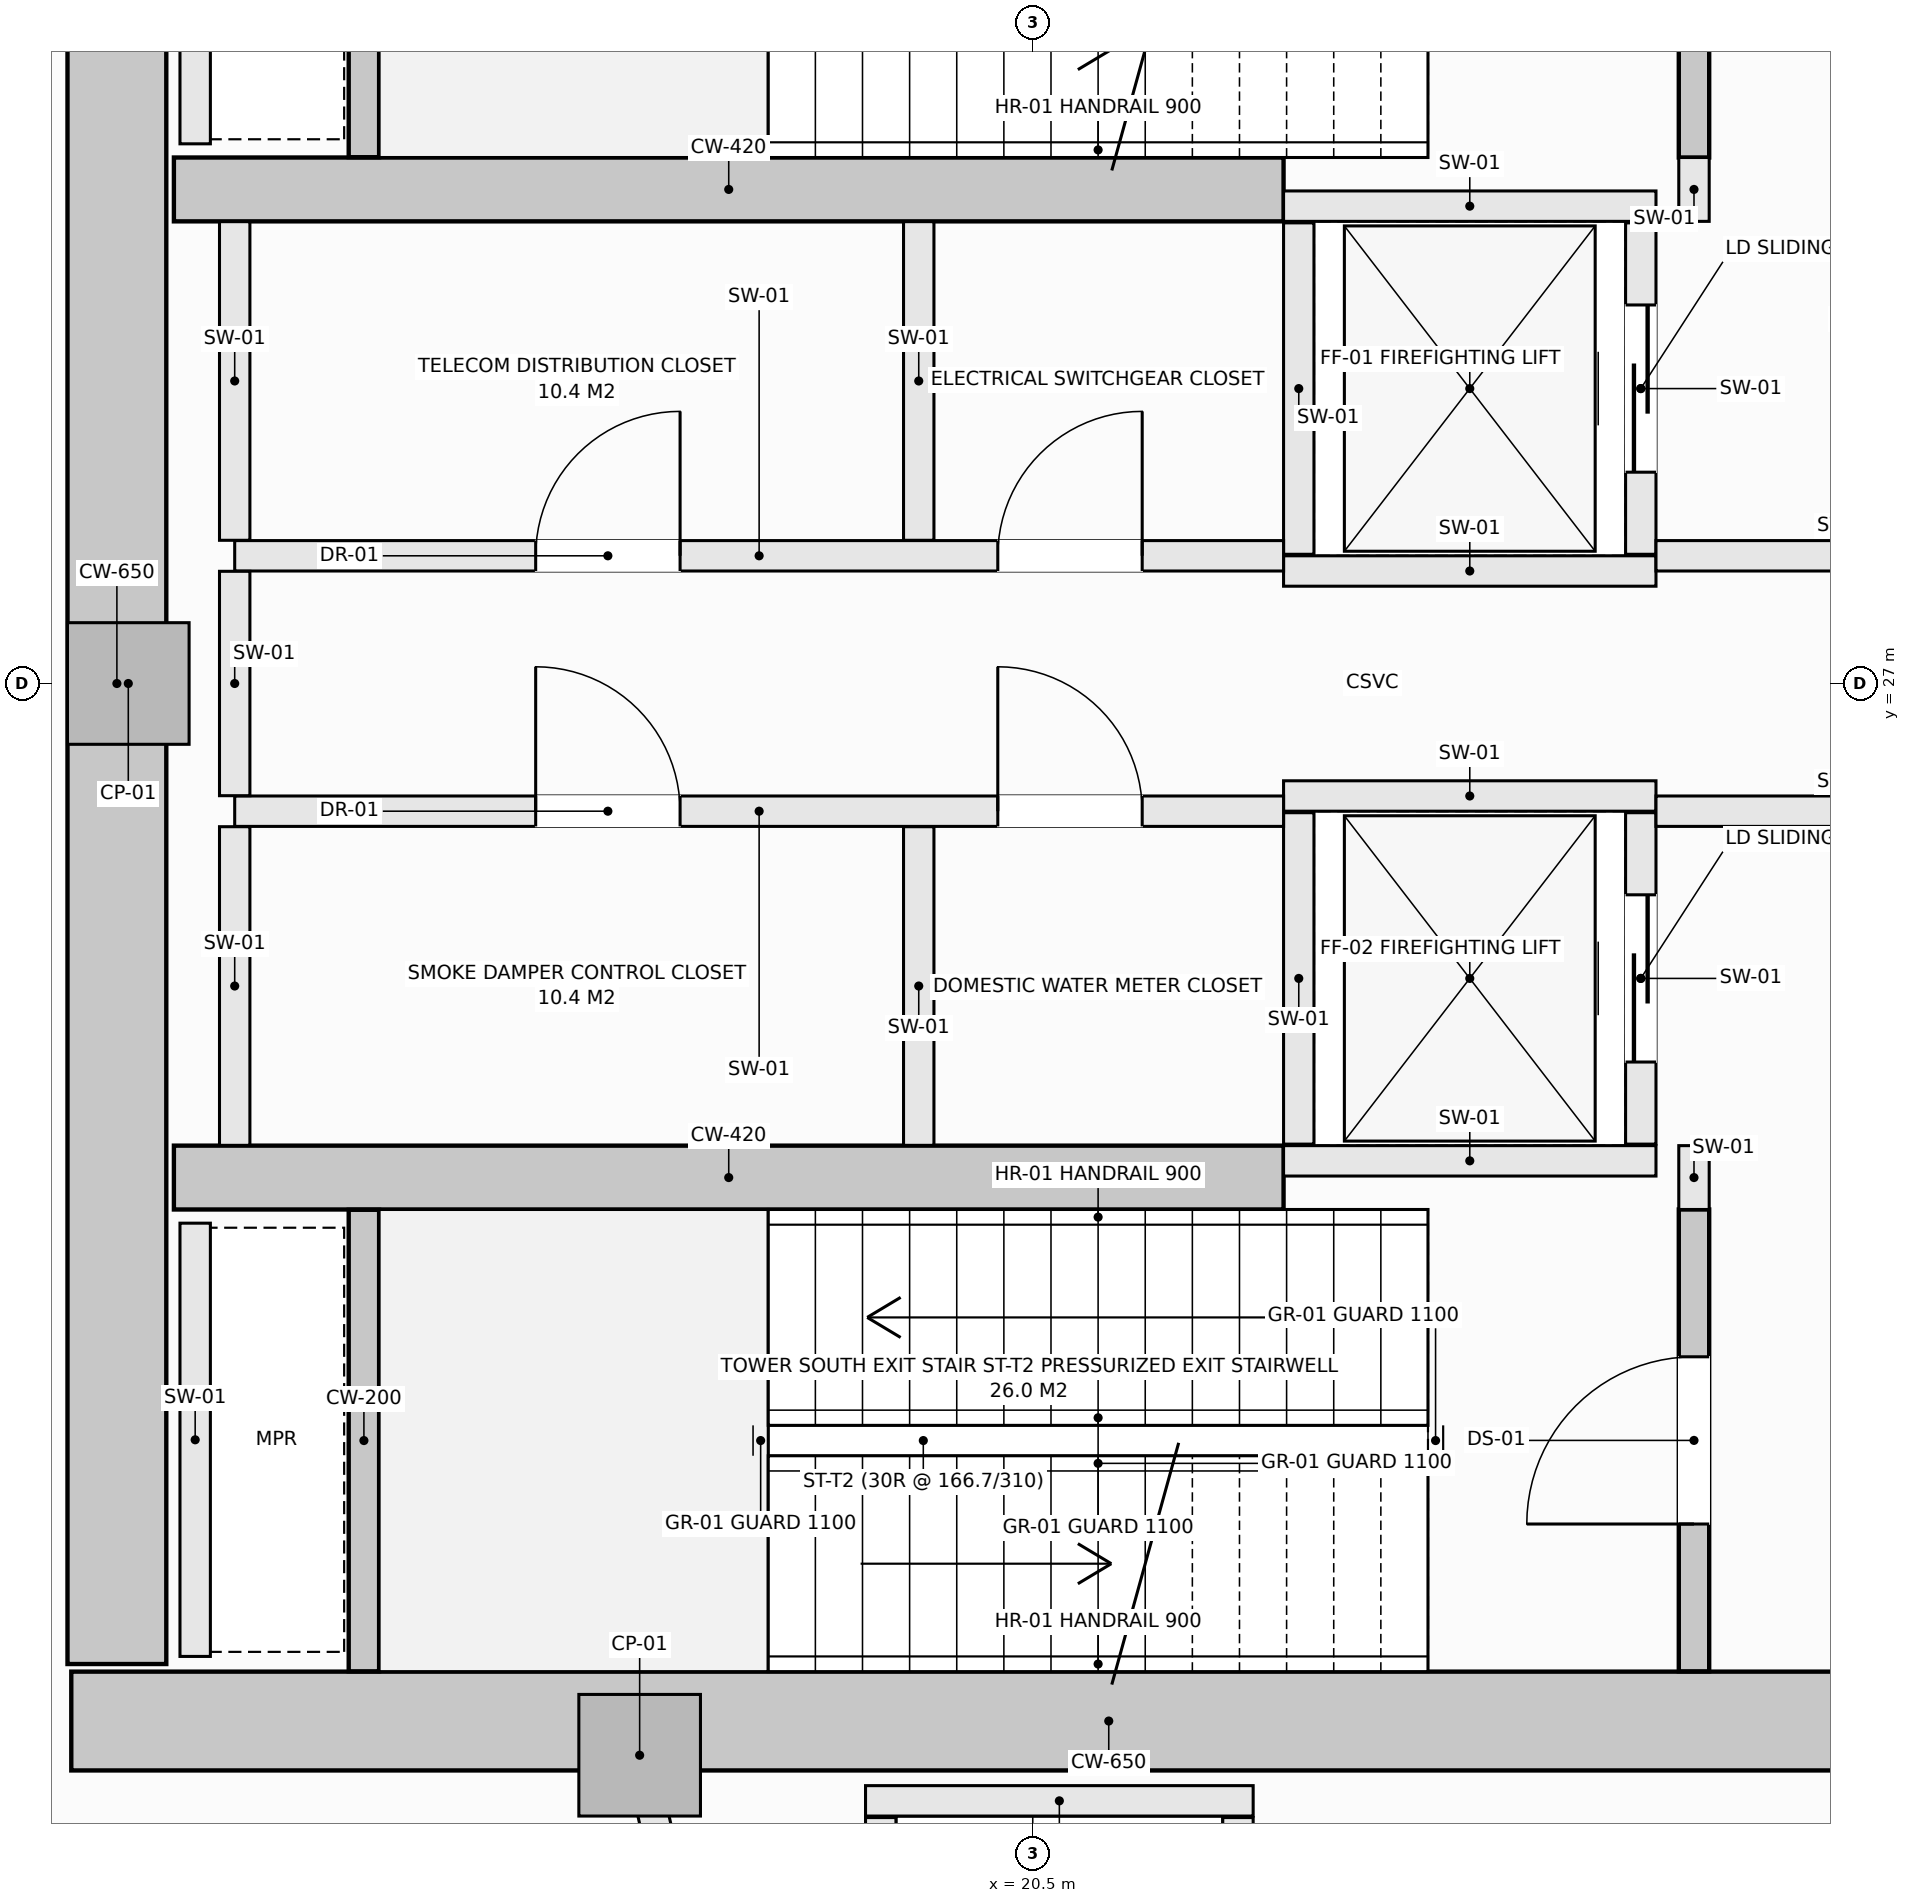
"""IFC4 building model, lengths in metres.
Left out: names, types, materials, properties, quantities, classifications, styles, units other than length and angle.
Written with IfcOpenShell. Run it as: python <this file> out.ifc"""

import sys

from ifc_helpers import new_model, si_unit, direction, frame, frame_2d, origin, origin_2d, place, context, subcontext, project, spatial, rectangle, extrude, element, fill, save


model = new_model("IFC4")
c1 = context("Model", 3, precision=1e-05, world=origin(), true_north=direction((0.0, 1.0)))
c2 = subcontext(c1, "Body", "Model", "MODEL_VIEW")
j1 = project(units=[si_unit("LENGTHUNIT", "METRE"), si_unit("PLANEANGLEUNIT", "RADIAN")], contexts=[c1])
p1 = place(None, origin())
s1 = spatial("IfcSite", under=j1, at=p1, CompositionType="ELEMENT")
p2 = place(p1, origin())
s2 = spatial("IfcBuilding", under=s1, at=p2, CompositionType="ELEMENT")
p3 = place(p2, frame((0.0, 0.0, 186.9)))
s3 = spatial("IfcBuildingStorey", under=s2, at=p3, CompositionType="ELEMENT", Elevation=186.9)
p4 = place(p3, frame((14.175, 20.175, -0.32), z_axis=(0.0, 0.0, 1.0), x_axis=(1.0, 0.0, 0.0)))
e1 = element("IfcWall", 1, at=p4, inside=s3, PredefinedType="SHEAR", context=c2, shape_type="SweptSolid", body=[
    extrude(rectangle(XDim=13.65, YDim=0.65, at=frame_2d((6.825, 0.0))), origin(), (0.0, 0.0, 1.0), 5.04),
])
p5 = place(p3, frame((14.475, 20.55, -0.32), z_axis=(0.0, 0.0, 1.0), x_axis=(0.0, 1.0, 0.0)))
e2 = element("IfcWall", 2, at=p5, inside=s3, PredefinedType="SHEAR", context=c2, shape_type="SweptSolid", body=[
    extrude(rectangle(XDim=12.9, YDim=0.65, at=frame_2d((6.45, 0.0))), origin(), (0.0, 0.0, 1.0), 5.04),
])
for number, where, z_axis, x_axis in (
    (3, (14.85, 30.25, -0.32), (0.0, 0.0, 1.0), (1.0, 0.0, 0.0)),
    (4, (14.85, 23.75, -0.32), (0.0, 0.0, 1.0), (1.0, 0.0, 0.0)),
):
    element("IfcWall", number, at=place(p3, frame(where, z_axis=z_axis, x_axis=x_axis)), inside=s3, PredefinedType="SHEAR", context=c2, shape_type="SweptSolid", body=[
        extrude(rectangle(XDim=7.3, YDim=0.42, at=frame_2d((3.65, 0.0))), origin(), (0.0, 0.0, 1.0), 5.04),
    ])
for number, where, z_axis, x_axis in (
    (5, (14.55, 27.0, -0.32), (0.0, 0.0, 1.0), (1.0, 0.0, 0.0)),
    (6, (17.914, 19.95, -0.32), (0.0, 0.0, 1.0), (1.0, 0.0, 0.0)),
):
    element("IfcColumn", number, at=place(p3, frame(where, z_axis=z_axis, x_axis=x_axis)), inside=s3, PredefinedType="PILASTER", context=c2, shape_type="SweptSolid", body=[
        extrude(rectangle(XDim=0.8, YDim=0.8, at=origin_2d()), origin(), (0.0, 0.0, 1.0), 5.04),
    ])
p6 = place(p3, frame((24.85, 30.46, -0.32), z_axis=(0.0, 0.0, 1.0), x_axis=(0.0, 1.0, 0.0)))
e7 = element("IfcWall", 7, at=p6, inside=s3, PredefinedType="SHEAR", context=c2, shape_type="SweptSolid", body=[
    extrude(rectangle(XDim=3.038, YDim=0.2, at=frame_2d((1.519, 0.0))), origin(), (0.0, 0.0, 1.0), 5.04),
])
p7 = place(p6, frame((0.969, 0.0, 0.32)))
e8 = element("IfcOpeningElement", 8, at=p7, cuts=e7, PredefinedType="OPENING", context=c2, shape_type="SweptSolid", body=[
    extrude(rectangle(XDim=1.1, YDim=2.15, at=frame_2d((0.55, 1.075))), frame((0.0, 0.11, 0.0), z_axis=(0.0, -1.0, 0.0), x_axis=(1.0, 0.0, 0.0)), (0.0, 0.0, 1.0), 0.22),
])
p8 = place(p3, frame((16.1, 30.462, -0.32), z_axis=(0.0, 0.0, 1.0), x_axis=(0.0, 1.0, 0.0)))
e9 = element("IfcWall", 9, at=p8, inside=s3, PredefinedType="SHEAR", context=c2, shape_type="SweptSolid", body=[
    extrude(rectangle(XDim=3.036, YDim=0.2, at=frame_2d((1.518, 0.0))), origin(), (0.0, 0.0, 1.0), 5.04),
])
p9 = place(p3, frame((24.85, 20.502, -0.32), z_axis=(0.0, 0.0, 1.0), x_axis=(0.0, 1.0, 0.0)))
e10 = element("IfcWall", 10, at=p9, inside=s3, PredefinedType="SHEAR", context=c2, shape_type="SweptSolid", body=[
    extrude(rectangle(XDim=3.038, YDim=0.2, at=frame_2d((1.519, 0.0))), origin(), (0.0, 0.0, 1.0), 5.04),
])
p10 = place(p9, frame((0.969, 0.0, 0.32)))
e11 = element("IfcOpeningElement", 11, at=p10, cuts=e10, PredefinedType="OPENING", context=c2, shape_type="SweptSolid", body=[
    extrude(rectangle(XDim=1.1, YDim=2.15, at=frame_2d((0.55, 1.075))), frame((0.0, 0.11, 0.0), z_axis=(0.0, -1.0, 0.0), x_axis=(1.0, 0.0, 0.0)), (0.0, 0.0, 1.0), 0.22),
])
p11 = place(p3, frame((16.1, 20.502, -0.32), z_axis=(0.0, 0.0, 1.0), x_axis=(0.0, 1.0, 0.0)))
e12 = element("IfcWall", 12, at=p11, inside=s3, PredefinedType="SHEAR", context=c2, shape_type="SweptSolid", body=[
    extrude(rectangle(XDim=3.036, YDim=0.2, at=frame_2d((1.518, 0.0))), origin(), (0.0, 0.0, 1.0), 5.04),
])
for number, where, z_axis, x_axis in (
    (13, (22.15, 30.14, 0.0), (0.0, 0.0, 1.0), (1.0, 0.0, 0.0)),
    (14, (22.15, 27.74, 0.0), (0.0, 0.0, 1.0), (1.0, 0.0, 0.0)),
):
    element("IfcWall", number, at=place(p3, frame(where, z_axis=z_axis, x_axis=x_axis)), inside=s3, PredefinedType="SOLIDWALL", context=c2, shape_type="SweptSolid", body=[
        extrude(rectangle(XDim=2.45, YDim=0.2, at=frame_2d((1.225, 0.0))), origin(), (0.0, 0.0, 1.0), 4.72),
    ])
p12 = place(p3, frame((22.25, 27.85, 0.0), z_axis=(0.0, 0.0, 1.0), x_axis=(0.0, 1.0, 0.0)))
e15 = element("IfcWall", 15, at=p12, inside=s3, PredefinedType="SOLIDWALL", context=c2, shape_type="SweptSolid", body=[
    extrude(rectangle(XDim=2.18, YDim=0.2, at=frame_2d((1.09, 0.0))), origin(), (0.0, 0.0, 1.0), 4.72),
])
p13 = place(p3, frame((24.5, 27.85, 0.0), z_axis=(0.0, 0.0, 1.0), x_axis=(0.0, 1.0, 0.0)))
e16 = element("IfcWall", 16, at=p13, inside=s3, PredefinedType="SOLIDWALL", context=c2, shape_type="SweptSolid", body=[
    extrude(rectangle(XDim=2.18, YDim=0.2, at=frame_2d((1.09, 0.0))), origin(), (0.0, 0.0, 1.0), 4.72),
])
p14 = place(p13, frame((0.54, 0.0, 0.0)))
e17 = element("IfcOpeningElement", 17, at=p14, cuts=e16, PredefinedType="OPENING", context=c2, shape_type="SweptSolid", body=[
    extrude(rectangle(XDim=1.1, YDim=2.2, at=frame_2d((0.55, 1.1))), frame((0.0, 0.11, 0.0), z_axis=(0.0, -1.0, 0.0), x_axis=(1.0, 0.0, 0.0)), (0.0, 0.0, 1.0), 0.22),
])
for number, where, z_axis, x_axis in (
    (18, (22.15, 26.26, 0.0), (0.0, 0.0, 1.0), (1.0, 0.0, 0.0)),
    (19, (22.15, 23.86, 0.0), (0.0, 0.0, 1.0), (1.0, 0.0, 0.0)),
):
    element("IfcWall", number, at=place(p3, frame(where, z_axis=z_axis, x_axis=x_axis)), inside=s3, PredefinedType="SOLIDWALL", context=c2, shape_type="SweptSolid", body=[
        extrude(rectangle(XDim=2.45, YDim=0.2, at=frame_2d((1.225, 0.0))), origin(), (0.0, 0.0, 1.0), 4.72),
    ])
p15 = place(p3, frame((22.25, 23.97, 0.0), z_axis=(0.0, 0.0, 1.0), x_axis=(0.0, 1.0, 0.0)))
e20 = element("IfcWall", 20, at=p15, inside=s3, PredefinedType="SOLIDWALL", context=c2, shape_type="SweptSolid", body=[
    extrude(rectangle(XDim=2.18, YDim=0.2, at=frame_2d((1.09, 0.0))), origin(), (0.0, 0.0, 1.0), 4.72),
])
p16 = place(p3, frame((24.5, 23.97, 0.0), z_axis=(0.0, 0.0, 1.0), x_axis=(0.0, 1.0, 0.0)))
e21 = element("IfcWall", 21, at=p16, inside=s3, PredefinedType="SOLIDWALL", context=c2, shape_type="SweptSolid", body=[
    extrude(rectangle(XDim=2.18, YDim=0.2, at=frame_2d((1.09, 0.0))), origin(), (0.0, 0.0, 1.0), 4.72),
])
p17 = place(p16, frame((0.54, 0.0, 0.0)))
e22 = element("IfcOpeningElement", 22, at=p17, cuts=e21, PredefinedType="OPENING", context=c2, shape_type="SweptSolid", body=[
    extrude(rectangle(XDim=1.1, YDim=2.2, at=frame_2d((0.55, 1.1))), frame((0.0, 0.11, 0.0), z_axis=(0.0, -1.0, 0.0), x_axis=(1.0, 0.0, 0.0)), (0.0, 0.0, 1.0), 0.22),
])
p18 = place(p3, frame((19.4, 19.65, 0.0), z_axis=(0.0, 0.0, 1.0), x_axis=(1.0, 0.0, 0.0)))
e23 = element("IfcWall", 23, at=p18, inside=s3, PredefinedType="SOLIDWALL", context=c2, shape_type="SweptSolid", body=[
    extrude(rectangle(XDim=2.55, YDim=0.2, at=frame_2d((1.275, 0.0))), origin(), (0.0, 0.0, 1.0), 4.72),
])
for number, where, z_axis, x_axis in (
    (24, (19.5, 17.01, 0.0), (0.0, 0.0, 1.0), (0.0, 1.0, 0.0)),
    (25, (21.85, 17.01, 0.0), (0.0, 0.0, 1.0), (0.0, 1.0, 0.0)),
):
    element("IfcWall", number, at=place(p3, frame(where, z_axis=z_axis, x_axis=x_axis)), inside=s3, PredefinedType="SOLIDWALL", context=c2, shape_type="SweptSolid", body=[
        extrude(rectangle(XDim=2.53, YDim=0.2, at=frame_2d((1.265, 0.0))), origin(), (0.0, 0.0, 1.0), 4.72),
    ])
for number, where, z_axis, x_axis in (
    (26, (14.99, 30.55, 0.0), (0.0, 0.0, 1.0), (0.0, 1.0, 0.0)),
    (27, (14.99, 20.6, 0.0), (0.0, 0.0, 1.0), (0.0, 1.0, 0.0)),
):
    element("IfcWall", number, at=place(p3, frame(where, z_axis=z_axis, x_axis=x_axis)), inside=s3, PredefinedType="SOLIDWALL", context=c2, shape_type="SweptSolid", body=[
        extrude(rectangle(XDim=2.85, YDim=0.2, at=frame_2d((1.425, 0.0))), origin(), (0.0, 0.0, 1.0), 4.72),
    ])
for number, where, z_axis, x_axis in (
    (28, (24.85, 23.54, 0.0), (0.0, 0.0, 1.0), (0.0, 1.0, 0.0)),
    (29, (24.85, 30.04, 0.0), (0.0, 0.0, 1.0), (0.0, 1.0, 0.0)),
):
    element("IfcWall", number, at=place(p3, frame(where, z_axis=z_axis, x_axis=x_axis)), inside=s3, PredefinedType="SOLIDWALL", context=c2, shape_type="SweptSolid", body=[
        extrude(rectangle(XDim=0.42, YDim=0.2, at=frame_2d((0.21, 0.0))), origin(), (0.0, 0.0, 1.0), 4.72),
    ])
p19 = place(p3, frame((15.25, 27.84, 0.0), z_axis=(0.0, 0.0, 1.0), x_axis=(1.0, 0.0, 0.0)))
e30 = element("IfcWall", 30, at=p19, inside=s3, PredefinedType="SOLIDWALL", context=c2, shape_type="SweptSolid", body=[
    extrude(rectangle(XDim=6.9, YDim=0.2, at=frame_2d((3.45, 0.0))), origin(), (0.0, 0.0, 1.0), 4.72),
])
p20 = place(p19, frame((5.02, 0.0, 0.0)))
e31 = element("IfcOpeningElement", 31, at=p20, cuts=e30, PredefinedType="OPENING", context=c2, shape_type="SweptSolid", body=[
    extrude(rectangle(XDim=0.95, YDim=2.1, at=frame_2d((0.475, 1.05))), frame((0.0, 0.11, 0.0), z_axis=(0.0, -1.0, 0.0), x_axis=(1.0, 0.0, 0.0)), (0.0, 0.0, 1.0), 0.22),
])
p21 = place(p19, frame((1.98, 0.0, 0.0)))
e32 = element("IfcOpeningElement", 32, at=p21, cuts=e30, PredefinedType="OPENING", context=c2, shape_type="SweptSolid", body=[
    extrude(rectangle(XDim=0.95, YDim=2.1, at=frame_2d((0.475, 1.05))), frame((0.0, 0.11, 0.0), z_axis=(0.0, -1.0, 0.0), x_axis=(1.0, 0.0, 0.0)), (0.0, 0.0, 1.0), 0.22),
])
p22 = place(p3, frame((24.6, 27.84, 0.0), z_axis=(0.0, 0.0, 1.0), x_axis=(1.0, 0.0, 0.0)))
e33 = element("IfcWall", 33, at=p22, inside=s3, PredefinedType="SOLIDWALL", context=c2, shape_type="SweptSolid", body=[
    extrude(rectangle(XDim=2.918, YDim=0.2, at=frame_2d((1.459, 0.0))), origin(), (0.0, 0.0, 1.0), 4.72),
])
p23 = place(p3, frame((15.25, 26.16, 0.0), z_axis=(0.0, 0.0, 1.0), x_axis=(1.0, 0.0, 0.0)))
e34 = element("IfcWall", 34, at=p23, inside=s3, PredefinedType="SOLIDWALL", context=c2, shape_type="SweptSolid", body=[
    extrude(rectangle(XDim=6.9, YDim=0.2, at=frame_2d((3.45, 0.0))), origin(), (0.0, 0.0, 1.0), 4.72),
])
p24 = place(p23, frame((5.02, 0.0, 0.0)))
e35 = element("IfcOpeningElement", 35, at=p24, cuts=e34, PredefinedType="OPENING", context=c2, shape_type="SweptSolid", body=[
    extrude(rectangle(XDim=0.95, YDim=2.1, at=frame_2d((0.475, 1.05))), frame((0.0, 0.11, 0.0), z_axis=(0.0, -1.0, 0.0), x_axis=(1.0, 0.0, 0.0)), (0.0, 0.0, 1.0), 0.22),
])
p25 = place(p23, frame((1.98, 0.0, 0.0)))
e36 = element("IfcOpeningElement", 36, at=p25, cuts=e34, PredefinedType="OPENING", context=c2, shape_type="SweptSolid", body=[
    extrude(rectangle(XDim=0.95, YDim=2.1, at=frame_2d((0.475, 1.05))), frame((0.0, 0.11, 0.0), z_axis=(0.0, -1.0, 0.0), x_axis=(1.0, 0.0, 0.0)), (0.0, 0.0, 1.0), 0.22),
])
p26 = place(p3, frame((24.6, 26.16, 0.0), z_axis=(0.0, 0.0, 1.0), x_axis=(1.0, 0.0, 0.0)))
e37 = element("IfcWall", 37, at=p26, inside=s3, PredefinedType="SOLIDWALL", context=c2, shape_type="SweptSolid", body=[
    extrude(rectangle(XDim=2.918, YDim=0.2, at=frame_2d((1.459, 0.0))), origin(), (0.0, 0.0, 1.0), 4.72),
])
p27 = place(p3, frame((15.25, 23.962, 0.0), z_axis=(0.0, 0.0, 1.0), x_axis=(0.0, 1.0, 0.0)))
e38 = element("IfcWall", 38, at=p27, inside=s3, PredefinedType="SOLIDWALL", context=c2, shape_type="SweptSolid", body=[
    extrude(rectangle(XDim=2.096, YDim=0.2, at=frame_2d((1.048, 0.0))), origin(), (0.0, 0.0, 1.0), 4.72),
])
p28 = place(p3, frame((15.25, 26.262, 0.0), z_axis=(0.0, 0.0, 1.0), x_axis=(0.0, 1.0, 0.0)))
e39 = element("IfcWall", 39, at=p28, inside=s3, PredefinedType="SOLIDWALL", context=c2, shape_type="SweptSolid", body=[
    extrude(rectangle(XDim=1.476, YDim=0.2, at=frame_2d((0.738, 0.0))), origin(), (0.0, 0.0, 1.0), 4.72),
])
for number, where, z_axis, x_axis in (
    (40, (15.25, 27.942, 0.0), (0.0, 0.0, 1.0), (0.0, 1.0, 0.0)),
    (41, (19.75, 23.962, 0.0), (0.0, 0.0, 1.0), (0.0, 1.0, 0.0)),
    (42, (19.75, 27.942, 0.0), (0.0, 0.0, 1.0), (0.0, 1.0, 0.0)),
):
    element("IfcWall", number, at=place(p3, frame(where, z_axis=z_axis, x_axis=x_axis)), inside=s3, PredefinedType="SOLIDWALL", context=c2, shape_type="SweptSolid", body=[
        extrude(rectangle(XDim=2.096, YDim=0.2, at=frame_2d((1.048, 0.0))), origin(), (0.0, 0.0, 1.0), 4.72),
    ])
p29 = place(p3, frame((17.937, 19.848, 0.0), z_axis=(0.0, 0.0, 1.0), x_axis=(0.221752397237, -0.97510300703, 0.0)))
e43 = element("IfcWall", 43, at=p29, inside=s3, PredefinedType="SOLIDWALL", context=c2, shape_type="SweptSolid", body=[
    extrude(rectangle(XDim=1.045, YDim=0.2, at=frame_2d((0.522, 0.0))), origin(), (0.0, 0.0, 1.0), 4.095),
])
p30 = place(p10, origin())
e44 = element("IfcDoor", 44, at=p30, inside=s3, OperationType="SINGLE_SWING_LEFT", PredefinedType="DOOR", context=c2, shape_type="SweptSolid", body=[
    extrude(rectangle(XDim=1.1, YDim=2.15, at=frame_2d((0.55, 1.075))), frame((0.0, 0.025, 0.0), z_axis=(0.0, -1.0, 0.0), x_axis=(1.0, 0.0, 0.0)), (0.0, 0.0, 1.0), 0.05),
])
fill(e11, e44)
p31 = place(p14, origin())
e45 = element("IfcDoor", 45, at=p31, inside=s3, OperationType="SLIDING_TO_LEFT", PredefinedType="DOOR", context=c2, shape_type="SweptSolid", body=[
    extrude(rectangle(XDim=1.1, YDim=2.2, at=frame_2d((0.55, 1.1))), frame((0.0, 0.025, 0.0), z_axis=(0.0, -1.0, 0.0), x_axis=(1.0, 0.0, 0.0)), (0.0, 0.0, 1.0), 0.05),
])
fill(e17, e45)
p32 = place(p17, origin())
e46 = element("IfcDoor", 46, at=p32, inside=s3, OperationType="SLIDING_TO_LEFT", PredefinedType="DOOR", context=c2, shape_type="SweptSolid", body=[
    extrude(rectangle(XDim=1.1, YDim=2.2, at=frame_2d((0.55, 1.1))), frame((0.0, 0.025, 0.0), z_axis=(0.0, -1.0, 0.0), x_axis=(1.0, 0.0, 0.0)), (0.0, 0.0, 1.0), 0.05),
])
fill(e22, e46)
p33 = place(p20, origin())
e47 = element("IfcDoor", 47, at=p33, inside=s3, OperationType="SINGLE_SWING_RIGHT", PredefinedType="DOOR", context=c2, shape_type="SweptSolid", body=[
    extrude(rectangle(XDim=0.95, YDim=2.1, at=frame_2d((0.475, 1.05))), frame((0.0, 0.025, 0.0), z_axis=(0.0, -1.0, 0.0), x_axis=(1.0, 0.0, 0.0)), (0.0, 0.0, 1.0), 0.05),
])
fill(e31, e47)
p34 = place(p24, origin())
e48 = element("IfcDoor", 48, at=p34, inside=s3, OperationType="SINGLE_SWING_LEFT", PredefinedType="DOOR", context=c2, shape_type="SweptSolid", body=[
    extrude(rectangle(XDim=0.95, YDim=2.1, at=frame_2d((0.475, 1.05))), frame((0.0, 0.025, 0.0), z_axis=(0.0, -1.0, 0.0), x_axis=(1.0, 0.0, 0.0)), (0.0, 0.0, 1.0), 0.05),
])
fill(e35, e48)
p35 = place(p21, origin())
e49 = element("IfcDoor", 49, at=p35, inside=s3, OperationType="SINGLE_SWING_RIGHT", PredefinedType="DOOR", context=c2, shape_type="SweptSolid", body=[
    extrude(rectangle(XDim=0.95, YDim=2.1, at=frame_2d((0.475, 1.05))), frame((0.0, 0.025, 0.0), z_axis=(0.0, -1.0, 0.0), x_axis=(1.0, 0.0, 0.0)), (0.0, 0.0, 1.0), 0.05),
])
fill(e32, e49)
p36 = place(p25, origin())
e50 = element("IfcDoor", 50, at=p36, inside=s3, OperationType="SINGLE_SWING_LEFT", PredefinedType="DOOR", context=c2, shape_type="SweptSolid", body=[
    extrude(rectangle(XDim=0.95, YDim=2.1, at=frame_2d((0.475, 1.05))), frame((0.0, 0.025, 0.0), z_axis=(0.0, -1.0, 0.0), x_axis=(1.0, 0.0, 0.0)), (0.0, 0.0, 1.0), 0.05),
])
fill(e36, e50)
save(model, sys.argv[1])
